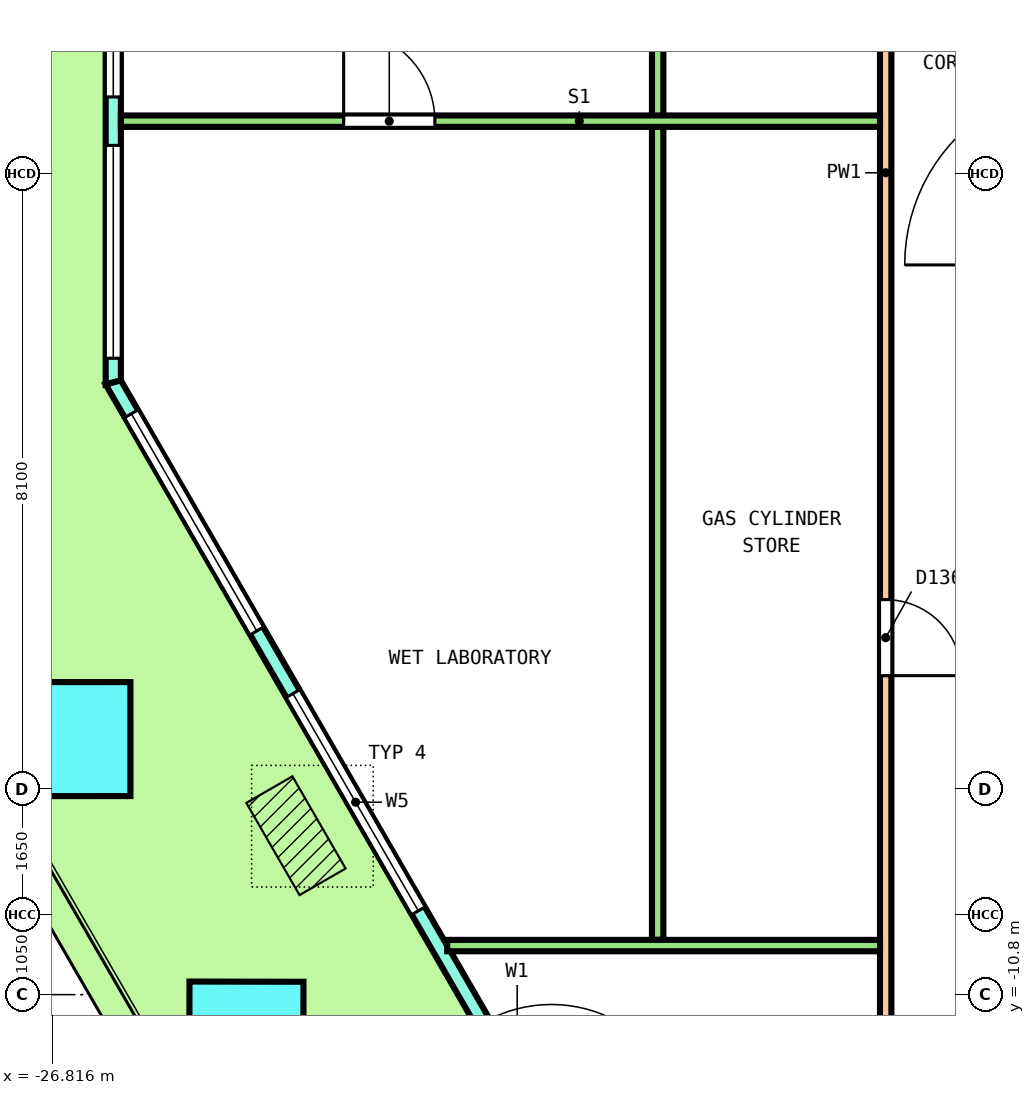
"""IFC4 building model, lengths in metres.
Left out: names, types, materials, properties, quantities, classifications, styles, units other than length and angle.
Written with IfcOpenShell. Run it as: python <this file> out.ifc"""

import sys

from ifc_helpers import new_model, si_unit, direction, frame, frame_2d, origin, origin_2d, place, context, subcontext, project, spatial, polyline, rectangle, outline, extrude, element, fill, save


model = new_model("IFC4")
c1 = context("Model", 3, precision=1e-05, world=origin(), true_north=direction((0.0, 1.0)))
c2 = subcontext(c1, "Body", "Model", "MODEL_VIEW")
j1 = project(units=[si_unit("LENGTHUNIT", "METRE"), si_unit("PLANEANGLEUNIT", "RADIAN")], contexts=[c1])
p1 = place(None, origin())
s1 = spatial("IfcSite", under=j1, at=p1, CompositionType="ELEMENT")
p2 = place(p1, origin())
s2 = spatial("IfcBuilding", under=s1, at=p2, CompositionType="ELEMENT")
p3 = place(p2, frame((0.0, 0.0, 36.6)))
s3 = spatial("IfcBuildingStorey", under=s2, at=p3, CompositionType="ELEMENT", Elevation=36.6)
p4 = place(p3, frame((-26.536, -7.438, 0.0), z_axis=(-0.010848648059, 0.01886459357, 0.999763188933), x_axis=(0.498562444949, -0.866580592009, 0.021761572546)))
e1 = element("IfcColumn", 1, at=p4, inside=s3, PredefinedType="COLUMN", context=c2, shape_type="SweptSolid", body=[
    extrude(rectangle(XDim=1.5, YDim=1.5, at=origin_2d()), origin(), (0.0, 0.0, 1.0), 4.051),
])
p5 = place(p3, frame((-24.261, -11.379, 0.0), z_axis=(-0.003616977835, 0.006269428248, 0.999973805527), x_axis=(0.498177151135, -0.867045061108, 0.007237962107)))
e2 = element("IfcColumn", 2, at=p5, inside=s3, PredefinedType="COLUMN", context=c2, shape_type="SweptSolid", body=[
    extrude(rectangle(XDim=1.5, YDim=1.5, at=origin_2d()), origin(), (0.0, 0.0, 1.0), 4.05),
])
p6 = place(p3, frame((-26.012, 4.129, 0.0), z_axis=(0.0, 0.0, 1.0), x_axis=(0.0, -1.0, 0.0)))
e3 = element("IfcWall", 3, at=p6, inside=s3, PredefinedType="SOLIDWALL", context=c2, shape_type="SweptSolid", body=[
    extrude(outline(polyline([(-0.027, -0.1), (1.128, -0.1), (2.282, -0.1), (3.437, -0.1), (4.592, -0.1), (5.747, -0.1), (6.901, -0.1), (6.848, 0.1), (5.711, 0.1), (4.574, 0.1), (3.437, 0.1), (2.301, 0.1), (1.164, 0.1), (0.027, 0.1), (-0.027, -0.1)])), origin(), (0.0, 0.0, 1.0), 4.1),
])
p7 = place(p6, frame((0.319, 0.0, 0.1)))
e4 = element("IfcOpeningElement", 4, at=p7, cuts=e3, PredefinedType="OPENING", context=c2, shape_type="SweptSolid", body=[
    extrude(rectangle(XDim=2.8, YDim=2.9, at=frame_2d((1.4, 1.45))), frame((0.0, 0.11, 0.0), z_axis=(0.0, -1.0, 0.0), x_axis=(1.0, 0.0, 0.0)), (0.0, 0.0, 1.0), 0.22),
])
p8 = place(p6, frame((3.756, 0.0, 0.1)))
e5 = element("IfcOpeningElement", 5, at=p8, cuts=e3, PredefinedType="OPENING", context=c2, shape_type="SweptSolid", body=[
    extrude(rectangle(XDim=2.8, YDim=2.9, at=frame_2d((1.4, 1.45))), frame((0.0, 0.11, 0.0), z_axis=(0.0, -1.0, 0.0), x_axis=(1.0, 0.0, 0.0)), (0.0, 0.0, 1.0), 0.22),
])
p9 = place(p3, frame((-26.012, -2.746, 0.0), z_axis=(0.0, 0.0, 1.0), x_axis=(0.499998188434, -0.86602644969, 0.0)))
e6 = element("IfcWall", 6, at=p9, inside=s3, PredefinedType="SOLIDWALL", context=c2, shape_type="SweptSolid", body=[
    extrude(outline(polyline([(-0.027, -0.1), (0.988, -0.1), (2.003, -0.1), (3.017, -0.1), (4.032, -0.1), (5.047, -0.1), (6.062, -0.1), (7.076, -0.1), (8.091, -0.1), (9.106, -0.1), (10.121, -0.1), (11.135, -0.1), (12.15, -0.1), (13.165, -0.1), (14.179, -0.1), (15.194, -0.1), (16.209, -0.1), (17.224, -0.1), (18.239, -0.1), (19.253, -0.1), (20.268, -0.1), (21.283, -0.1), (21.229, 0.1), (20.219, 0.1), (19.21, 0.1), (18.2, 0.1), (17.19, 0.1), (16.181, 0.1), (15.171, 0.1), (14.162, 0.1), (13.152, 0.1), (12.142, 0.1), (11.133, 0.1), (10.123, 0.1), (9.114, 0.1), (8.104, 0.1), (7.094, 0.1), (6.085, 0.1), (5.075, 0.1), (4.065, 0.1), (3.056, 0.1), (2.046, 0.1), (1.036, 0.1), (0.027, 0.1), (-0.027, -0.1)])), origin(), (0.0, 0.0, 1.0), 4.1),
])
p10 = place(p9, frame((0.476, 0.0, 0.1)))
e7 = element("IfcOpeningElement", 7, at=p10, cuts=e6, PredefinedType="OPENING", context=c2, shape_type="SweptSolid", body=[
    extrude(rectangle(XDim=3.3, YDim=2.9, at=frame_2d((1.65, 1.45))), frame((0.0, 0.11, 0.0), z_axis=(0.0, -1.0, 0.0), x_axis=(1.0, 0.0, 0.0)), (0.0, 0.0, 1.0), 0.22),
])
p11 = place(p9, frame((4.727, 0.0, 0.1)))
e8 = element("IfcOpeningElement", 8, at=p11, cuts=e6, PredefinedType="OPENING", context=c2, shape_type="SweptSolid", body=[
    extrude(rectangle(XDim=3.3, YDim=2.9, at=frame_2d((1.65, 1.45))), frame((0.0, 0.11, 0.0), z_axis=(0.0, -1.0, 0.0), x_axis=(1.0, 0.0, 0.0)), (0.0, 0.0, 1.0), 0.22),
])
p12 = place(p9, frame((9.728, 0.0, 0.0)))
e9 = element("IfcOpeningElement", 9, at=p12, cuts=e6, PredefinedType="OPENING", context=c2, shape_type="SweptSolid", body=[
    extrude(rectangle(XDim=1.8, YDim=2.4, at=frame_2d((0.9, 1.2))), frame((0.0, 0.11, 0.0), z_axis=(0.0, -1.0, 0.0), x_axis=(1.0, 0.0, 0.0)), (0.0, 0.0, 1.0), 0.22),
])
p13 = place(p9, frame((9.728, 0.0, 2.55)))
e10 = element("IfcOpeningElement", 10, at=p13, cuts=e6, PredefinedType="OPENING", context=c2, shape_type="SweptSolid", body=[
    extrude(rectangle(XDim=1.8, YDim=0.45, at=frame_2d((0.9, 0.225))), frame((0.0, 0.11, 0.0), z_axis=(0.0, -1.0, 0.0), x_axis=(1.0, 0.0, 0.0)), (0.0, 0.0, 1.0), 0.22),
])
p14 = place(p9, frame((13.229, 0.0, 0.1)))
e11 = element("IfcOpeningElement", 11, at=p14, cuts=e6, PredefinedType="OPENING", context=c2, shape_type="SweptSolid", body=[
    extrude(rectangle(XDim=3.3, YDim=2.9, at=frame_2d((1.65, 1.45))), frame((0.0, 0.11, 0.0), z_axis=(0.0, -1.0, 0.0), x_axis=(1.0, 0.0, 0.0)), (0.0, 0.0, 1.0), 0.22),
])
p15 = place(p9, frame((17.48, 0.0, 0.1)))
e12 = element("IfcOpeningElement", 12, at=p15, cuts=e6, PredefinedType="OPENING", context=c2, shape_type="SweptSolid", body=[
    extrude(rectangle(XDim=3.3, YDim=2.9, at=frame_2d((1.65, 1.45))), frame((0.0, 0.11, 0.0), z_axis=(0.0, -1.0, 0.0), x_axis=(1.0, 0.0, 0.0)), (0.0, 0.0, 1.0), 0.22),
])
p16 = place(p3, frame((-15.85, -13.375, 0.0), z_axis=(0.0, 0.0, 1.0), x_axis=(0.0, 1.0, 0.0)))
e13 = element("IfcWall", 13, at=p16, inside=s3, PredefinedType="PARTITIONING", context=c2, shape_type="SweptSolid", body=[
    extrude(rectangle(XDim=26.775, YDim=0.15, at=frame_2d((13.387, 0.0))), origin(), (0.0, 0.0, 1.0), 3.05),
])
p17 = place(p16, frame((24.693, 0.0, 0.0)))
e14 = element("IfcOpeningElement", 14, at=p17, cuts=e13, PredefinedType="OPENING", context=c2, shape_type="SweptSolid", body=[
    extrude(rectangle(XDim=1.0, YDim=2.1, at=frame_2d((0.5, 1.05))), frame((0.0, 0.085, 0.0), z_axis=(0.0, -1.0, 0.0), x_axis=(1.0, 0.0, 0.0)), (0.0, 0.0, 1.0), 0.17),
])
p18 = place(p16, frame((16.495, 0.0, 0.0)))
e15 = element("IfcOpeningElement", 15, at=p18, cuts=e13, PredefinedType="OPENING", context=c2, shape_type="SweptSolid", body=[
    extrude(rectangle(XDim=1.0, YDim=2.1, at=frame_2d((0.5, 1.05))), frame((0.0, 0.085, 0.0), z_axis=(0.0, -1.0, 0.0), x_axis=(1.0, 0.0, 0.0)), (0.0, 0.0, 1.0), 0.17),
])
p19 = place(p16, frame((6.771, 0.0, 0.0)))
e16 = element("IfcOpeningElement", 16, at=p19, cuts=e13, PredefinedType="OPENING", context=c2, shape_type="SweptSolid", body=[
    extrude(rectangle(XDim=1.0, YDim=2.1, at=frame_2d((0.5, 1.05))), frame((0.0, 0.085, 0.0), z_axis=(0.0, -1.0, 0.0), x_axis=(1.0, 0.0, 0.0)), (0.0, 0.0, 1.0), 0.17),
])
p20 = place(p3, frame((-18.85, -10.08, 0.0), z_axis=(0.0, 0.0, 1.0), x_axis=(0.0, 1.0, 0.0)))
e17 = element("IfcWall", 17, at=p20, inside=s3, PredefinedType="PARTITIONING", context=c2, shape_type="SweptSolid", body=[
    extrude(rectangle(XDim=20.737, YDim=0.15, at=frame_2d((10.369, 0.0))), origin(), (0.0, 0.0, 1.0), 3.05),
])
p21 = place(p20, frame((17.208, 0.0, 0.0)))
e18 = element("IfcOpeningElement", 18, at=p21, cuts=e17, PredefinedType="OPENING", context=c2, shape_type="SweptSolid", body=[
    extrude(rectangle(XDim=1.2, YDim=2.1, at=frame_2d((0.6, 1.05))), frame((0.0, 0.085, 0.0), z_axis=(0.0, -1.0, 0.0), x_axis=(1.0, 0.0, 0.0)), (0.0, 0.0, 1.0), 0.17),
])
p22 = place(p3, frame((-25.912, 0.691, 0.0), z_axis=(0.0, 0.0, 1.0), x_axis=(1.0, 0.0, 0.0)))
e19 = element("IfcWall", 19, at=p22, inside=s3, PredefinedType="PARTITIONING", context=c2, shape_type="SweptSolid", body=[
    extrude(rectangle(XDim=9.987, YDim=0.15, at=frame_2d((4.994, 0.0))), origin(), (0.0, 0.0, 1.0), 3.05),
])
p23 = place(p22, frame((2.931, 0.0, 0.0)))
e20 = element("IfcOpeningElement", 20, at=p23, cuts=e19, PredefinedType="OPENING", context=c2, shape_type="SweptSolid", body=[
    extrude(rectangle(XDim=1.2, YDim=2.1, at=frame_2d((0.6, 1.05))), frame((0.0, 0.085, 0.0), z_axis=(0.0, -1.0, 0.0), x_axis=(1.0, 0.0, 0.0)), (0.0, 0.0, 1.0), 0.17),
])
p24 = place(p3, frame((-21.619, -10.155, 0.0), z_axis=(0.0, 0.0, 1.0), x_axis=(1.0, 0.0, 0.0)))
e21 = element("IfcWall", 21, at=p24, inside=s3, PredefinedType="PARTITIONING", context=c2, shape_type="SweptSolid", body=[
    extrude(rectangle(XDim=5.694, YDim=0.15, at=frame_2d((2.847, 0.0))), origin(), (0.0, 0.0, 1.0), 3.05),
])
p25 = place(p7, origin())
e22 = element("IfcWindow", 22, at=p25, inside=s3, PartitioningType="SINGLE_PANEL", PredefinedType="WINDOW", context=c2, shape_type="SweptSolid", body=[
    extrude(rectangle(XDim=2.8, YDim=2.9, at=frame_2d((1.4, 1.45))), frame((0.0, 0.03, 0.0), z_axis=(0.0, -1.0, 0.0), x_axis=(1.0, 0.0, 0.0)), (0.0, 0.0, 1.0), 0.06),
])
fill(e4, e22)
p26 = place(p8, origin())
e23 = element("IfcWindow", 23, at=p26, inside=s3, PartitioningType="SINGLE_PANEL", PredefinedType="WINDOW", context=c2, shape_type="SweptSolid", body=[
    extrude(rectangle(XDim=2.8, YDim=2.9, at=frame_2d((1.4, 1.45))), frame((0.0, 0.03, 0.0), z_axis=(0.0, -1.0, 0.0), x_axis=(1.0, 0.0, 0.0)), (0.0, 0.0, 1.0), 0.06),
])
fill(e5, e23)
p27 = place(p10, origin())
e24 = element("IfcWindow", 24, at=p27, inside=s3, PartitioningType="SINGLE_PANEL", PredefinedType="WINDOW", context=c2, shape_type="SweptSolid", body=[
    extrude(rectangle(XDim=3.3, YDim=2.9, at=frame_2d((1.65, 1.45))), frame((0.0, 0.03, 0.0), z_axis=(0.0, -1.0, 0.0), x_axis=(1.0, 0.0, 0.0)), (0.0, 0.0, 1.0), 0.06),
])
fill(e7, e24)
p28 = place(p11, origin())
e25 = element("IfcWindow", 25, at=p28, inside=s3, PartitioningType="SINGLE_PANEL", PredefinedType="WINDOW", context=c2, shape_type="SweptSolid", body=[
    extrude(rectangle(XDim=3.3, YDim=2.9, at=frame_2d((1.65, 1.45))), frame((0.0, 0.03, 0.0), z_axis=(0.0, -1.0, 0.0), x_axis=(1.0, 0.0, 0.0)), (0.0, 0.0, 1.0), 0.06),
])
fill(e8, e25)
p29 = place(p23, origin())
e26 = element("IfcDoor", 26, at=p29, inside=s3, OperationType="DOUBLE_DOOR_SINGLE_SWING", PredefinedType="DOOR", context=c2, shape_type="SweptSolid", body=[
    extrude(rectangle(XDim=1.2, YDim=2.1, at=frame_2d((0.6, 1.05))), frame((0.0, 0.025, 0.0), z_axis=(0.0, -1.0, 0.0), x_axis=(1.0, 0.0, 0.0)), (0.0, 0.0, 1.0), 0.05),
])
fill(e20, e26)
p30 = place(p19, origin())
e27 = element("IfcDoor", 27, at=p30, inside=s3, OperationType="SINGLE_SWING_LEFT", PredefinedType="DOOR", context=c2, shape_type="SweptSolid", body=[
    extrude(rectangle(XDim=1.0, YDim=2.1, at=frame_2d((0.5, 1.05))), frame((0.0, 0.025, 0.0), z_axis=(0.0, -1.0, 0.0), x_axis=(1.0, 0.0, 0.0)), (0.0, 0.0, 1.0), 0.05),
])
fill(e16, e27)
save(model, sys.argv[1])
